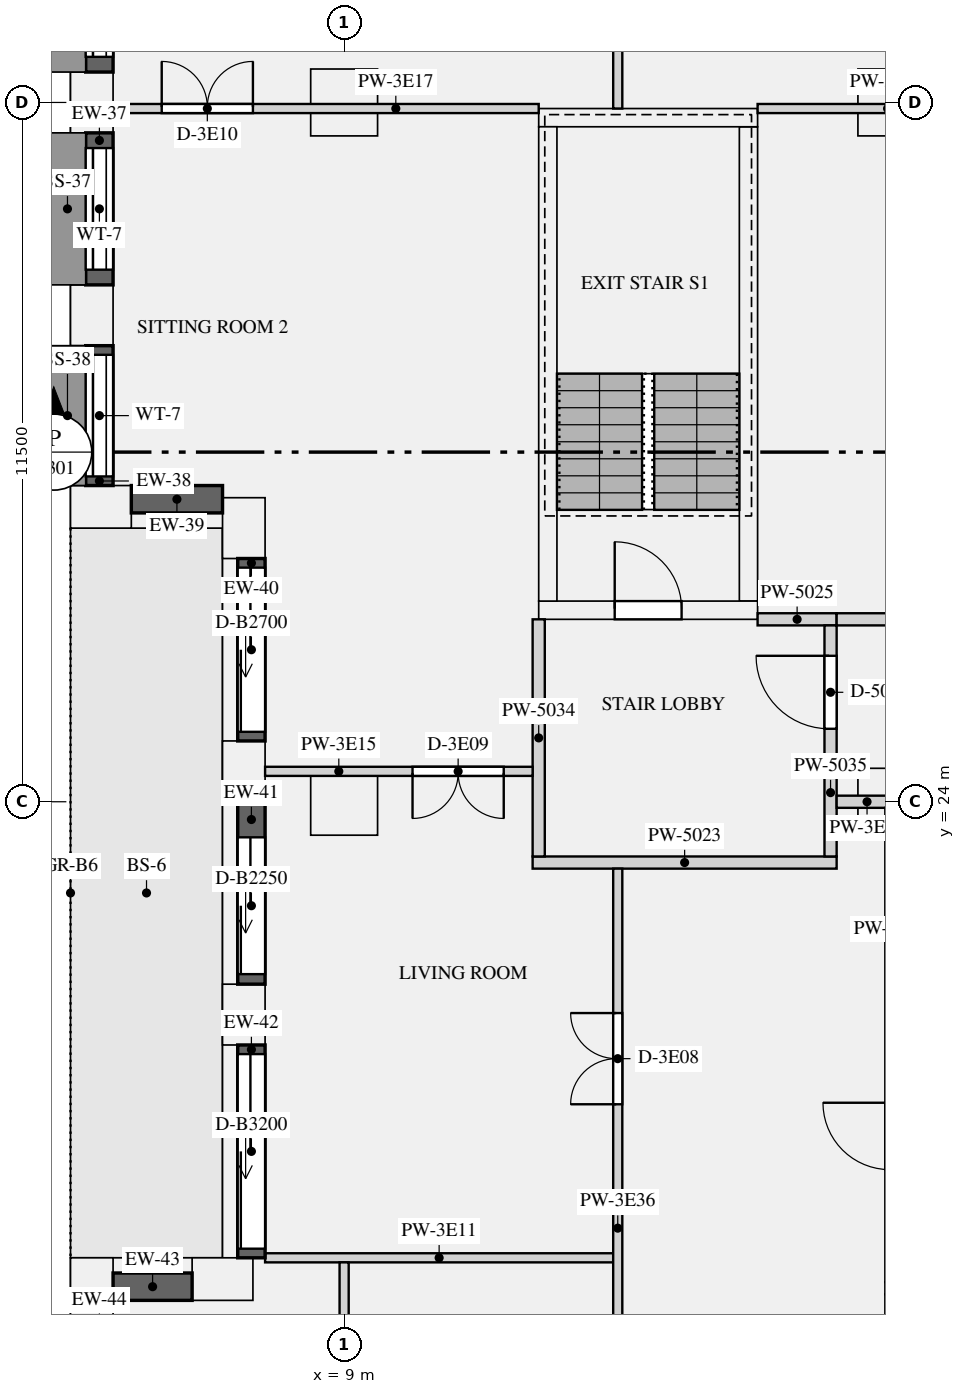
"""IFC4 building model, lengths in metres.
Left out: names, types, materials, properties, quantities, classifications, styles, units other than length and angle.
Written with IfcOpenShell. Run it as: python <this file> out.ifc"""

import sys

from ifc_helpers import new_model, si_unit, direction, frame, frame_2d, origin, origin_2d, place, context, subcontext, project, spatial, rectangle, extrude, element, fill, save


model = new_model("IFC4")
c1 = context("Model", 3, precision=1e-05, world=origin(), true_north=direction((0.0, 1.0)))
c2 = subcontext(c1, "Body", "Model", "MODEL_VIEW")
j1 = project(units=[si_unit("LENGTHUNIT", "METRE"), si_unit("PLANEANGLEUNIT", "RADIAN")], contexts=[c1])
p1 = place(None, origin())
s1 = spatial("IfcSite", under=j1, at=p1, CompositionType="ELEMENT")
p2 = place(p1, origin())
s2 = spatial("IfcBuilding", under=s1, at=p2, CompositionType="ELEMENT")
p3 = place(p2, frame((0.0, 0.0, 172.8)))
s3 = spatial("IfcBuildingStorey", under=s2, at=p3, CompositionType="ELEMENT", Elevation=172.8)
for number, where, z_axis, x_axis in (
    (1, (4.85, 35.5, 0.0), (0.0, 0.0, 1.0), (0.0, -1.0, 0.0)),
    (2, (4.85, 32.0, 0.0), (0.0, 0.0, 1.0), (0.0, -1.0, 0.0)),
    (3, (5.0, 28.85, 0.0), (0.0, 0.0, 1.0), (1.0, 0.0, 0.0)),
    (4, (7.35, 28.5, 0.0), (0.0, 0.0, 1.0), (0.0, -1.0, 0.0)),
    (5, (7.35, 24.5, 0.0), (0.0, 0.0, 1.0), (0.0, -1.0, 0.0)),
    (6, (7.35, 20.5, 0.0), (0.0, 0.0, 1.0), (0.0, -1.0, 0.0)),
    (7, (7.0, 16.15, 0.0), (0.0, 0.0, 1.0), (-1.0, 0.0, 0.0)),
    (8, (4.85, 16.0, 0.0), (0.0, 0.0, 1.0), (0.0, -1.0, 0.0)),
):
    element("IfcColumn", number, at=place(p3, frame(where, z_axis=z_axis, x_axis=x_axis)), inside=s3, PredefinedType="USERDEFINED", context=c2, shape_type="SweptSolid", body=[
        extrude(rectangle(XDim=1.0, YDim=0.7, at=origin_2d()), origin(), (0.0, 0.0, 1.0), 3.15),
    ])
for number, where, z_axis, x_axis in (
    (9, (9.0, 24.0, 0.0), (0.0, 0.0, 1.0), (1.0, 0.0, 0.0)),
    (10, (18.0, 24.0, 0.0), (0.0, 0.0, 1.0), (1.0, 0.0, 0.0)),
    (11, (9.0, 35.5, 0.0), (0.0, 0.0, 1.0), (1.0, 0.0, 0.0)),
    (12, (18.0, 35.5, 0.0), (0.0, 0.0, 1.0), (1.0, 0.0, 0.0)),
):
    element("IfcColumn", number, at=place(p3, frame(where, z_axis=z_axis, x_axis=x_axis)), inside=s3, PredefinedType="COLUMN", context=c2, shape_type="SweptSolid", body=[
        extrude(rectangle(XDim=1.1, YDim=1.1, at=origin_2d()), origin(), (0.0, 0.0, 1.0), 3.15),
    ])
p4 = place(p3, frame((12.2, 27.15, 0.0), z_axis=(0.0, 0.0, 1.0), x_axis=(1.0, 0.0, 0.0)))
e13 = element("IfcWall", 13, at=p4, inside=s3, PredefinedType="SHEAR", context=c2, shape_type="SweptSolid", body=[
    extrude(rectangle(XDim=3.6, YDim=0.3, at=frame_2d((1.8, 0.0))), origin(), (0.0, 0.0, 1.0), 3.15),
])
p5 = place(p4, frame((1.25, 0.0, 0.0)))
e14 = element("IfcOpeningElement", 14, at=p5, cuts=e13, PredefinedType="OPENING", context=c2, shape_type="SweptSolid", body=[
    extrude(rectangle(XDim=1.1, YDim=2.1, at=frame_2d((0.55, 1.05))), frame((0.0, 0.16, 0.0), z_axis=(0.0, -1.0, 0.0), x_axis=(1.0, 0.0, 0.0)), (0.0, 0.0, 1.0), 0.32),
])
p6 = place(p3, frame((12.2, 35.25, 0.0), z_axis=(0.0, 0.0, 1.0), x_axis=(1.0, 0.0, 0.0)))
e15 = element("IfcWall", 15, at=p6, inside=s3, PredefinedType="SHEAR", context=c2, shape_type="SweptSolid", body=[
    extrude(rectangle(XDim=3.6, YDim=0.3, at=frame_2d((1.8, 0.0))), origin(), (0.0, 0.0, 1.0), 3.15),
])
for number, where, z_axis, x_axis in (
    (16, (12.35, 27.3, 0.0), (0.0, 0.0, 1.0), (0.0, 1.0, 0.0)),
    (17, (15.65, 27.3, 0.0), (0.0, 0.0, 1.0), (0.0, 1.0, 0.0)),
):
    element("IfcWall", number, at=place(p3, frame(where, z_axis=z_axis, x_axis=x_axis)), inside=s3, PredefinedType="SHEAR", context=c2, shape_type="SweptSolid", body=[
        extrude(rectangle(XDim=7.8, YDim=0.3, at=frame_2d((3.9, 0.0))), origin(), (0.0, 0.0, 1.0), 3.15),
    ])
p7 = place(p3, frame((4.975, 38.0, 0.9), z_axis=(0.0, 0.0, 1.0), x_axis=(0.0, -1.0, 0.0)))
e18 = element("IfcWall", 18, at=p7, inside=s3, PredefinedType="SOLIDWALL", context=c2, shape_type="SweptSolid", body=[
    extrude(rectangle(XDim=2.0, YDim=0.45, at=frame_2d((1.0, 0.0))), origin(), (0.0, 0.0, 1.0), 1.93),
])
p8 = place(p7, frame((0.25, 0.0, 0.15)))
e19 = element("IfcOpeningElement", 19, at=p8, cuts=e18, PredefinedType="OPENING", context=c2, shape_type="SweptSolid", body=[
    extrude(rectangle(XDim=1.5, YDim=1.5, at=frame_2d((0.75, 0.75))), frame((0.0, 0.235, 0.0), z_axis=(0.0, -1.0, 0.0), x_axis=(1.0, 0.0, 0.0)), (0.0, 0.0, 1.0), 0.47),
])
p9 = place(p3, frame((4.975, 35.0, 0.9), z_axis=(0.0, 0.0, 1.0), x_axis=(0.0, -1.0, 0.0)))
e20 = element("IfcWall", 20, at=p9, inside=s3, PredefinedType="SOLIDWALL", context=c2, shape_type="SweptSolid", body=[
    extrude(rectangle(XDim=2.5, YDim=0.45, at=frame_2d((1.25, 0.0))), origin(), (0.0, 0.0, 1.0), 1.93),
])
p10 = place(p9, frame((0.25, 0.0, 0.15)))
e21 = element("IfcOpeningElement", 21, at=p10, cuts=e20, PredefinedType="OPENING", context=c2, shape_type="SweptSolid", body=[
    extrude(rectangle(XDim=2.0, YDim=1.5, at=frame_2d((1.0, 0.75))), frame((0.0, 0.235, 0.0), z_axis=(0.0, -1.0, 0.0), x_axis=(1.0, 0.0, 0.0)), (0.0, 0.0, 1.0), 0.47),
])
p11 = place(p3, frame((4.975, 31.5, 0.9), z_axis=(0.0, 0.0, 1.0), x_axis=(0.0, -1.0, 0.0)))
e22 = element("IfcWall", 22, at=p11, inside=s3, PredefinedType="SOLIDWALL", context=c2, shape_type="SweptSolid", body=[
    extrude(rectangle(XDim=2.3, YDim=0.45, at=frame_2d((1.15, 0.0))), origin(), (0.0, 0.0, 1.0), 1.93),
])
p12 = place(p11, frame((0.15, 0.0, 0.15)))
e23 = element("IfcOpeningElement", 23, at=p12, cuts=e22, PredefinedType="OPENING", context=c2, shape_type="SweptSolid", body=[
    extrude(rectangle(XDim=2.0, YDim=1.5, at=frame_2d((1.0, 0.75))), frame((0.0, 0.235, 0.0), z_axis=(0.0, -1.0, 0.0), x_axis=(1.0, 0.0, 0.0)), (0.0, 0.0, 1.0), 0.47),
])
p13 = place(p3, frame((5.5, 28.975, 0.9), z_axis=(0.0, 0.0, 1.0), x_axis=(1.0, 0.0, 0.0)))
e24 = element("IfcWall", 24, at=p13, inside=s3, PredefinedType="SOLIDWALL", context=c2, shape_type="SweptSolid", body=[
    extrude(rectangle(XDim=1.5, YDim=0.45, at=frame_2d((0.75, 0.0))), origin(), (0.0, 0.0, 1.0), 1.93),
])
p14 = place(p3, frame((7.475, 28.0, 0.0), z_axis=(0.0, 0.0, 1.0), x_axis=(0.0, -1.0, 0.0)))
e25 = element("IfcWall", 25, at=p14, inside=s3, PredefinedType="SOLIDWALL", context=c2, shape_type="SweptSolid", body=[
    extrude(rectangle(XDim=3.0, YDim=0.45, at=frame_2d((1.5, 0.0))), origin(), (0.0, 0.0, 1.0), 2.83),
])
p15 = place(p14, frame((0.15, 0.0, 0.0)))
e26 = element("IfcOpeningElement", 26, at=p15, cuts=e25, PredefinedType="OPENING", context=c2, shape_type="SweptSolid", body=[
    extrude(rectangle(XDim=2.7, YDim=2.3, at=frame_2d((1.35, 1.15))), frame((0.0, 0.235, 0.0), z_axis=(0.0, -1.0, 0.0), x_axis=(1.0, 0.0, 0.0)), (0.0, 0.0, 1.0), 0.47),
])
p16 = place(p3, frame((7.475, 24.0, 0.0), z_axis=(0.0, 0.0, 1.0), x_axis=(0.0, -1.0, 0.0)))
e27 = element("IfcWall", 27, at=p16, inside=s3, PredefinedType="SOLIDWALL", context=c2, shape_type="SweptSolid", body=[
    extrude(rectangle(XDim=3.0, YDim=0.45, at=frame_2d((1.5, 0.0))), origin(), (0.0, 0.0, 1.0), 2.83),
])
p17 = place(p16, frame((0.585, 0.0, 0.0)))
e28 = element("IfcOpeningElement", 28, at=p17, cuts=e27, PredefinedType="OPENING", context=c2, shape_type="SweptSolid", body=[
    extrude(rectangle(XDim=2.25, YDim=2.3, at=frame_2d((1.125, 1.15))), frame((0.0, 0.235, 0.0), z_axis=(0.0, -1.0, 0.0), x_axis=(1.0, 0.0, 0.0)), (0.0, 0.0, 1.0), 0.47),
])
p18 = place(p3, frame((7.475, 20.0, 0.0), z_axis=(0.0, 0.0, 1.0), x_axis=(0.0, -1.0, 0.0)))
e29 = element("IfcWall", 29, at=p18, inside=s3, PredefinedType="SOLIDWALL", context=c2, shape_type="SweptSolid", body=[
    extrude(rectangle(XDim=3.5, YDim=0.45, at=frame_2d((1.75, 0.0))), origin(), (0.0, 0.0, 1.0), 2.83),
])
p19 = place(p18, frame((0.15, 0.0, 0.0)))
e30 = element("IfcOpeningElement", 30, at=p19, cuts=e29, PredefinedType="OPENING", context=c2, shape_type="SweptSolid", body=[
    extrude(rectangle(XDim=3.2, YDim=2.3, at=frame_2d((1.6, 1.15))), frame((0.0, 0.235, 0.0), z_axis=(0.0, -1.0, 0.0), x_axis=(1.0, 0.0, 0.0)), (0.0, 0.0, 1.0), 0.47),
])
p20 = place(p3, frame((6.5, 16.025, 0.9), z_axis=(0.0, 0.0, 1.0), x_axis=(-1.0, 0.0, 0.0)))
e31 = element("IfcWall", 31, at=p20, inside=s3, PredefinedType="SOLIDWALL", context=c2, shape_type="SweptSolid", body=[
    extrude(rectangle(XDim=1.3, YDim=0.45, at=frame_2d((0.65, 0.0))), origin(), (0.0, 0.0, 1.0), 1.93),
])
p21 = place(p3, frame((12.1, 23.0, 0.0), z_axis=(0.0, 0.0, 1.0), x_axis=(1.0, 0.0, 0.0)))
e32 = element("IfcWall", 32, at=p21, inside=s3, PredefinedType="PARTITIONING", context=c2, shape_type="SweptSolid", body=[
    extrude(rectangle(XDim=5.0, YDim=0.2, at=frame_2d((2.5, 0.0))), origin(), (0.0, 0.0, 1.0), 2.83),
])
p22 = place(p3, frame((15.8, 27.0, 0.0), z_axis=(0.0, 0.0, 1.0), x_axis=(1.0, 0.0, 0.0)))
e33 = element("IfcWall", 33, at=p22, inside=s3, PredefinedType="PARTITIONING", context=c2, shape_type="SweptSolid", body=[
    extrude(rectangle(XDim=1.3, YDim=0.2, at=frame_2d((0.65, 0.0))), origin(), (0.0, 0.0, 1.0), 2.83),
])
p23 = place(p3, frame((12.2, 23.1, 0.0), z_axis=(0.0, 0.0, 1.0), x_axis=(0.0, 1.0, 0.0)))
e34 = element("IfcWall", 34, at=p23, inside=s3, PredefinedType="PARTITIONING", context=c2, shape_type="SweptSolid", body=[
    extrude(rectangle(XDim=3.9, YDim=0.2, at=frame_2d((1.95, 0.0))), origin(), (0.0, 0.0, 1.0), 2.83),
])
p24 = place(p3, frame((17.0, 23.1, 0.0), z_axis=(0.0, 0.0, 1.0), x_axis=(0.0, 1.0, 0.0)))
e35 = element("IfcWall", 35, at=p24, inside=s3, PredefinedType="PARTITIONING", context=c2, shape_type="SweptSolid", body=[
    extrude(rectangle(XDim=3.8, YDim=0.2, at=frame_2d((1.9, 0.0))), origin(), (0.0, 0.0, 1.0), 2.83),
])
p25 = place(p24, frame((2.1, 0.0, 0.0)))
e36 = element("IfcOpeningElement", 36, at=p25, cuts=e35, PredefinedType="OPENING", context=c2, shape_type="SweptSolid", body=[
    extrude(rectangle(XDim=1.2, YDim=2.1, at=frame_2d((0.6, 1.05))), frame((0.0, 0.11, 0.0), z_axis=(0.0, -1.0, 0.0), x_axis=(1.0, 0.0, 0.0)), (0.0, 0.0, 1.0), 0.22),
])
p26 = place(p3, frame((17.1, 24.0, 0.0), z_axis=(0.0, 0.0, 1.0), x_axis=(1.0, 0.0, 0.0)))
e37 = element("IfcWall", 37, at=p26, inside=s3, PredefinedType="PARTITIONING", context=c2, shape_type="SweptSolid", body=[
    extrude(rectangle(XDim=1.0, YDim=0.2, at=frame_2d((0.5, 0.0))), origin(), (0.0, 0.0, 1.0), 2.83),
])
p27 = place(p3, frame((17.1, 27.0, 0.0), z_axis=(0.0, 0.0, 1.0), x_axis=(1.0, 0.0, 0.0)))
e38 = element("IfcWall", 38, at=p27, inside=s3, PredefinedType="PARTITIONING", context=c2, shape_type="SweptSolid", body=[
    extrude(rectangle(XDim=7.0, YDim=0.2, at=frame_2d((3.5, 0.0))), origin(), (0.0, 0.0, 1.0), 2.83),
])
p28 = place(p3, frame((7.7, 16.5, 0.0), z_axis=(0.0, 0.0, 1.0), x_axis=(1.0, 0.0, 0.0)))
e39 = element("IfcWall", 39, at=p28, inside=s3, PredefinedType="PARTITIONING", context=c2, shape_type="SweptSolid", body=[
    extrude(rectangle(XDim=5.725, YDim=0.15, at=frame_2d((2.863, 0.0))), origin(), (0.0, 0.0, 1.0), 2.83),
])
p29 = place(p3, frame((7.7, 24.5, 0.0), z_axis=(0.0, 0.0, 1.0), x_axis=(1.0, 0.0, 0.0)))
e40 = element("IfcWall", 40, at=p29, inside=s3, PredefinedType="PARTITIONING", context=c2, shape_type="SweptSolid", body=[
    extrude(rectangle(XDim=4.4, YDim=0.15, at=frame_2d((2.2, 0.0))), origin(), (0.0, 0.0, 1.0), 2.83),
])
p30 = place(p29, frame((2.425, 0.0, 0.0)))
e41 = element("IfcOpeningElement", 41, at=p30, cuts=e40, PredefinedType="OPENING", context=c2, shape_type="SweptSolid", body=[
    extrude(rectangle(XDim=1.5, YDim=2.1, at=frame_2d((0.75, 1.05))), frame((0.0, 0.085, 0.0), z_axis=(0.0, -1.0, 0.0), x_axis=(1.0, 0.0, 0.0)), (0.0, 0.0, 1.0), 0.17),
])
p31 = place(p3, frame((5.2, 35.4, 0.0), z_axis=(0.0, 0.0, 1.0), x_axis=(1.0, 0.0, 0.0)))
e42 = element("IfcWall", 42, at=p31, inside=s3, PredefinedType="PARTITIONING", context=c2, shape_type="SweptSolid", body=[
    extrude(rectangle(XDim=7.0, YDim=0.15, at=frame_2d((3.5, 0.0))), origin(), (0.0, 0.0, 1.0), 2.83),
])
p32 = place(p31, frame((0.8, 0.0, 0.0)))
e43 = element("IfcOpeningElement", 43, at=p32, cuts=e42, PredefinedType="OPENING", context=c2, shape_type="SweptSolid", body=[
    extrude(rectangle(XDim=1.5, YDim=2.1, at=frame_2d((0.75, 1.05))), frame((0.0, 0.085, 0.0), z_axis=(0.0, -1.0, 0.0), x_axis=(1.0, 0.0, 0.0)), (0.0, 0.0, 1.0), 0.17),
])
p33 = place(p3, frame((15.8, 35.4, 0.0), z_axis=(0.0, 0.0, 1.0), x_axis=(1.0, 0.0, 0.0)))
e44 = element("IfcWall", 44, at=p33, inside=s3, PredefinedType="PARTITIONING", context=c2, shape_type="SweptSolid", body=[
    extrude(rectangle(XDim=6.775, YDim=0.15, at=frame_2d((3.387, 0.0))), origin(), (0.0, 0.0, 1.0), 2.83),
])
p34 = place(p33, frame((4.275, 0.0, 0.0)))
e45 = element("IfcOpeningElement", 45, at=p34, cuts=e44, PredefinedType="OPENING", context=c2, shape_type="SweptSolid", body=[
    extrude(rectangle(XDim=0.9, YDim=2.1, at=frame_2d((0.45, 1.05))), frame((0.0, 0.085, 0.0), z_axis=(0.0, -1.0, 0.0), x_axis=(1.0, 0.0, 0.0)), (0.0, 0.0, 1.0), 0.17),
])
p35 = place(p3, frame((13.5, 12.575, 0.0), z_axis=(0.0, 0.0, 1.0), x_axis=(0.0, 1.0, 0.0)))
e46 = element("IfcWall", 46, at=p35, inside=s3, PredefinedType="PARTITIONING", context=c2, shape_type="SweptSolid", body=[
    extrude(rectangle(XDim=10.325, YDim=0.15, at=frame_2d((5.163, 0.0))), origin(), (0.0, 0.0, 1.0), 2.83),
])
p36 = place(p35, frame((1.475, 0.0, 0.0)))
e47 = element("IfcOpeningElement", 47, at=p36, cuts=e46, PredefinedType="OPENING", context=c2, shape_type="SweptSolid", body=[
    extrude(rectangle(XDim=0.9, YDim=2.1, at=frame_2d((0.45, 1.05))), frame((0.0, 0.085, 0.0), z_axis=(0.0, -1.0, 0.0), x_axis=(1.0, 0.0, 0.0)), (0.0, 0.0, 1.0), 0.17),
])
p37 = place(p35, frame((6.45, 0.0, 0.0)))
e48 = element("IfcOpeningElement", 48, at=p37, cuts=e46, PredefinedType="OPENING", context=c2, shape_type="SweptSolid", body=[
    extrude(rectangle(XDim=1.5, YDim=2.1, at=frame_2d((0.75, 1.05))), frame((0.0, 0.085, 0.0), z_axis=(0.0, -1.0, 0.0), x_axis=(1.0, 0.0, 0.0)), (0.0, 0.0, 1.0), 0.17),
])
p38 = place(p3, frame((13.5, 35.4, 0.0), z_axis=(0.0, 0.0, 1.0), x_axis=(0.0, 1.0, 0.0)))
e49 = element("IfcWall", 49, at=p38, inside=s3, PredefinedType="PARTITIONING", context=c2, shape_type="SweptSolid", body=[
    extrude(rectangle(XDim=7.4, YDim=0.15, at=frame_2d((3.7, 0.0))), origin(), (0.0, 0.0, 1.0), 2.83),
])
p39 = place(p38, frame((3.325, 0.0, 0.0)))
e50 = element("IfcOpeningElement", 50, at=p39, cuts=e49, PredefinedType="OPENING", context=c2, shape_type="SweptSolid", body=[
    extrude(rectangle(XDim=0.9, YDim=2.1, at=frame_2d((0.45, 1.05))), frame((0.0, 0.085, 0.0), z_axis=(0.0, -1.0, 0.0), x_axis=(1.0, 0.0, 0.0)), (0.0, 0.0, 1.0), 0.17),
])
p40 = place(p3, frame((9.0, 8.575, 0.0), z_axis=(0.0, 0.0, 1.0), x_axis=(0.0, 1.0, 0.0)))
e51 = element("IfcWall", 51, at=p40, inside=s3, PredefinedType="PARTITIONING", context=c2, shape_type="SweptSolid", body=[
    extrude(rectangle(XDim=7.85, YDim=0.15, at=frame_2d((3.925, 0.0))), origin(), (0.0, 0.0, 1.0), 2.83),
])
p41 = place(p40, frame((1.2, 0.0, 0.0)))
e52 = element("IfcOpeningElement", 52, at=p41, cuts=e51, PredefinedType="OPENING", context=c2, shape_type="SweptSolid", body=[
    extrude(rectangle(XDim=0.9, YDim=2.1, at=frame_2d((0.45, 1.05))), frame((0.0, 0.085, 0.0), z_axis=(0.0, -1.0, 0.0), x_axis=(1.0, 0.0, 0.0)), (0.0, 0.0, 1.0), 0.17),
])
p42 = place(p8, origin())
e53 = element("IfcWindow", 53, at=p42, inside=s3, PartitioningType="SINGLE_PANEL", PredefinedType="WINDOW", context=c2, shape_type="SweptSolid", body=[
    extrude(rectangle(XDim=1.5, YDim=1.5, at=frame_2d((0.75, 0.75))), frame((0.0, -0.065, 0.0), z_axis=(0.0, -1.0, 0.0), x_axis=(1.0, 0.0, 0.0)), (0.0, 0.0, 1.0), 0.06),
])
fill(e19, e53)
p43 = place(p10, origin())
e54 = element("IfcWindow", 54, at=p43, inside=s3, PartitioningType="SINGLE_PANEL", PredefinedType="WINDOW", context=c2, shape_type="SweptSolid", body=[
    extrude(rectangle(XDim=2.0, YDim=1.5, at=frame_2d((1.0, 0.75))), frame((0.0, -0.065, 0.0), z_axis=(0.0, -1.0, 0.0), x_axis=(1.0, 0.0, 0.0)), (0.0, 0.0, 1.0), 0.06),
])
fill(e21, e54)
p44 = place(p12, origin())
e55 = element("IfcWindow", 55, at=p44, inside=s3, PartitioningType="SINGLE_PANEL", PredefinedType="WINDOW", context=c2, shape_type="SweptSolid", body=[
    extrude(rectangle(XDim=2.0, YDim=1.5, at=frame_2d((1.0, 0.75))), frame((0.0, -0.065, 0.0), z_axis=(0.0, -1.0, 0.0), x_axis=(1.0, 0.0, 0.0)), (0.0, 0.0, 1.0), 0.06),
])
fill(e23, e55)
p45 = place(p15, origin())
e56 = element("IfcDoor", 56, at=p45, inside=s3, OperationType="SLIDING_TO_LEFT", PredefinedType="DOOR", context=c2, shape_type="SweptSolid", body=[
    extrude(rectangle(XDim=2.7, YDim=2.3, at=frame_2d((1.35, 1.15))), frame((0.0, -0.07, 0.0), z_axis=(0.0, -1.0, 0.0), x_axis=(1.0, 0.0, 0.0)), (0.0, 0.0, 1.0), 0.05),
])
fill(e26, e56)
p46 = place(p17, origin())
e57 = element("IfcDoor", 57, at=p46, inside=s3, OperationType="SLIDING_TO_LEFT", PredefinedType="DOOR", context=c2, shape_type="SweptSolid", body=[
    extrude(rectangle(XDim=2.25, YDim=2.3, at=frame_2d((1.125, 1.15))), frame((0.0, -0.07, 0.0), z_axis=(0.0, -1.0, 0.0), x_axis=(1.0, 0.0, 0.0)), (0.0, 0.0, 1.0), 0.05),
])
fill(e28, e57)
p47 = place(p19, origin())
e58 = element("IfcDoor", 58, at=p47, inside=s3, OperationType="SLIDING_TO_LEFT", PredefinedType="DOOR", context=c2, shape_type="SweptSolid", body=[
    extrude(rectangle(XDim=3.2, YDim=2.3, at=frame_2d((1.6, 1.15))), frame((0.0, -0.07, 0.0), z_axis=(0.0, -1.0, 0.0), x_axis=(1.0, 0.0, 0.0)), (0.0, 0.0, 1.0), 0.05),
])
fill(e30, e58)
p48 = place(p5, origin())
e59 = element("IfcDoor", 59, at=p48, inside=s3, OperationType="SINGLE_SWING_LEFT", PredefinedType="DOOR", context=c2, shape_type="SweptSolid", body=[
    extrude(rectangle(XDim=1.1, YDim=2.1, at=frame_2d((0.55, 1.05))), frame((0.0, 0.025, 0.0), z_axis=(0.0, -1.0, 0.0), x_axis=(1.0, 0.0, 0.0)), (0.0, 0.0, 1.0), 0.05),
])
fill(e14, e59)
p49 = place(p25, origin())
e60 = element("IfcDoor", 60, at=p49, inside=s3, OperationType="SINGLE_SWING_RIGHT", PredefinedType="DOOR", context=c2, shape_type="SweptSolid", body=[
    extrude(rectangle(XDim=1.2, YDim=2.1, at=frame_2d((0.6, 1.05))), frame((0.0, 0.025, 0.0), z_axis=(0.0, -1.0, 0.0), x_axis=(1.0, 0.0, 0.0)), (0.0, 0.0, 1.0), 0.05),
])
fill(e36, e60)
p50 = place(p37, origin())
e61 = element("IfcDoor", 61, at=p50, inside=s3, OperationType="DOUBLE_DOOR_SINGLE_SWING", PredefinedType="DOOR", context=c2, shape_type="SweptSolid", body=[
    extrude(rectangle(XDim=1.5, YDim=2.1, at=frame_2d((0.75, 1.05))), frame((0.0, 0.025, 0.0), z_axis=(0.0, -1.0, 0.0), x_axis=(1.0, 0.0, 0.0)), (0.0, 0.0, 1.0), 0.05),
])
fill(e48, e61)
p51 = place(p30, frame((1.5, 0.0, 0.0), z_axis=(0.0, 0.0, 1.0), x_axis=(-1.0, 0.0, 0.0)))
e62 = element("IfcDoor", 62, at=p51, inside=s3, OperationType="DOUBLE_DOOR_SINGLE_SWING", PredefinedType="DOOR", context=c2, shape_type="SweptSolid", body=[
    extrude(rectangle(XDim=1.5, YDim=2.1, at=frame_2d((0.75, 1.05))), frame((0.0, 0.025, 0.0), z_axis=(0.0, -1.0, 0.0), x_axis=(1.0, 0.0, 0.0)), (0.0, 0.0, 1.0), 0.05),
])
fill(e41, e62)
p52 = place(p32, origin())
e63 = element("IfcDoor", 63, at=p52, inside=s3, OperationType="DOUBLE_DOOR_SINGLE_SWING", PredefinedType="DOOR", context=c2, shape_type="SweptSolid", body=[
    extrude(rectangle(XDim=1.5, YDim=2.1, at=frame_2d((0.75, 1.05))), frame((0.0, 0.025, 0.0), z_axis=(0.0, -1.0, 0.0), x_axis=(1.0, 0.0, 0.0)), (0.0, 0.0, 1.0), 0.05),
])
fill(e43, e63)
save(model, sys.argv[1])
